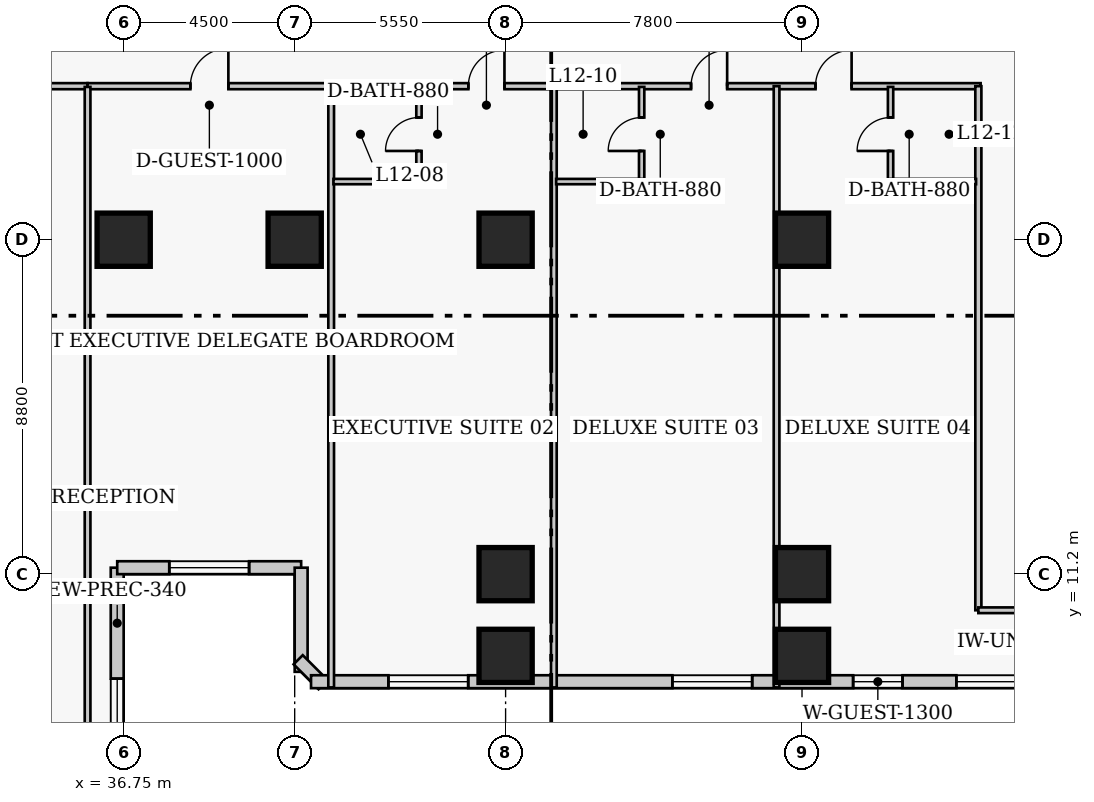
"""IFC4 building model, lengths in metres.
Left out: names, types, materials, properties, quantities, classifications, styles, units other than length and angle.
Written with IfcOpenShell. Run it as: python <this file> out.ifc"""

import sys

from ifc_helpers import new_model, si_unit, direction, frame, frame_2d, origin, origin_2d, place, context, subcontext, project, spatial, rectangle, extrude, element, fill, save


model = new_model("IFC4")
c1 = context("Model", 3, precision=1e-05, world=origin(), true_north=direction((0.0, 1.0)))
c2 = subcontext(c1, "Body", "Model", "MODEL_VIEW")
j1 = project(units=[si_unit("LENGTHUNIT", "METRE"), si_unit("PLANEANGLEUNIT", "RADIAN")], contexts=[c1])
p1 = place(None, origin())
s1 = spatial("IfcSite", under=j1, at=p1, CompositionType="ELEMENT")
p2 = place(p1, origin())
s2 = spatial("IfcBuilding", under=s1, at=p2, CompositionType="ELEMENT")
p3 = place(p2, frame((0.0, 0.0, 52.6)))
s3 = spatial("IfcBuildingStorey", under=s2, at=p3, CompositionType="ELEMENT", Elevation=52.6)
for number, where, z_axis, x_axis in (
    (1, (36.75, 20.0, 0.0), (0.0, 0.0, 1.0), (1.0, 0.0, 0.0)),
    (2, (41.25, 20.0, 0.0), (0.0, 0.0, 1.0), (1.0, 0.0, 0.0)),
    (3, (46.8, 11.2, 0.0), (0.0, 0.0, 1.0), (1.0, 0.0, 0.0)),
    (4, (46.8, 20.0, 0.0), (0.0, 0.0, 1.0), (1.0, 0.0, 0.0)),
    (5, (54.6, 11.2, 0.0), (0.0, 0.0, 1.0), (1.0, 0.0, 0.0)),
    (6, (54.6, 20.0, 0.0), (0.0, 0.0, 1.0), (1.0, 0.0, 0.0)),
    (7, (46.8, 9.05, 0.0), (0.0, 0.0, 1.0), (1.0, 0.0, 0.0)),
    (8, (54.6, 9.05, 0.0), (0.0, 0.0, 1.0), (1.0, 0.0, 0.0)),
):
    element("IfcColumn", number, at=place(p3, frame(where, z_axis=z_axis, x_axis=x_axis)), inside=s3, PredefinedType="COLUMN", context=c2, shape_type="SweptSolid", body=[
        extrude(rectangle(XDim=1.4, YDim=1.4, at=origin_2d()), origin(), (0.0, 0.0, 1.0), 3.8),
    ])
p4 = place(p3, frame((36.58, 3.43, 0.0), z_axis=(0.0, 0.0, 1.0), x_axis=(0.0, 1.0, 0.0)))
e9 = element("IfcWall", 9, at=p4, inside=s3, PredefinedType="SOLIDWALL", context=c2, shape_type="SweptSolid", body=[
    extrude(rectangle(XDim=7.94, YDim=0.34, at=frame_2d((3.97, 0.0))), origin(), (0.0, 0.0, 1.0), 3.54),
])
p5 = place(p4, frame((2.92, 0.0, 0.85)))
e10 = element("IfcOpeningElement", 10, at=p5, cuts=e9, PredefinedType="OPENING", context=c2, shape_type="SweptSolid", body=[
    extrude(rectangle(XDim=2.1, YDim=1.85, at=frame_2d((1.05, 0.925))), frame((0.0, 0.18, 0.0), z_axis=(0.0, -1.0, 0.0), x_axis=(1.0, 0.0, 0.0)), (0.0, 0.0, 1.0), 0.36),
])
p6 = place(p3, frame((36.58, 11.37, 0.0), z_axis=(0.0, 0.0, 1.0), x_axis=(1.0, 0.0, 0.0)))
e11 = element("IfcWall", 11, at=p6, inside=s3, PredefinedType="SOLIDWALL", context=c2, shape_type="SweptSolid", body=[
    extrude(rectangle(XDim=4.84, YDim=0.34, at=frame_2d((2.42, 0.0))), origin(), (0.0, 0.0, 1.0), 3.54),
])
p7 = place(p6, frame((1.37, 0.0, 0.85)))
e12 = element("IfcOpeningElement", 12, at=p7, cuts=e11, PredefinedType="OPENING", context=c2, shape_type="SweptSolid", body=[
    extrude(rectangle(XDim=2.1, YDim=1.85, at=frame_2d((1.05, 0.925))), frame((0.0, 0.18, 0.0), z_axis=(0.0, -1.0, 0.0), x_axis=(1.0, 0.0, 0.0)), (0.0, 0.0, 1.0), 0.36),
])
p8 = place(p3, frame((41.42, 11.37, 0.0), z_axis=(0.0, 0.0, 1.0), x_axis=(0.0, -1.0, 0.0)))
e13 = element("IfcWall", 13, at=p8, inside=s3, PredefinedType="SOLIDWALL", context=c2, shape_type="SweptSolid", body=[
    extrude(rectangle(XDim=2.74, YDim=0.34, at=frame_2d((1.37, 0.0))), origin(), (0.0, 0.0, 1.0), 3.54),
])
p9 = place(p3, frame((41.342, 8.948, 0.0), z_axis=(0.0, 0.0, 1.0), x_axis=(0.707238225886, -0.706975312048, 0.0)))
e14 = element("IfcWall", 14, at=p9, inside=s3, PredefinedType="SOLIDWALL", context=c2, shape_type="SweptSolid", body=[
    extrude(rectangle(XDim=0.929, YDim=0.34, at=frame_2d((0.464, 0.0))), origin(), (0.0, 0.0, 1.0), 3.54),
])
p10 = place(p3, frame((41.68, 8.37, 0.0), z_axis=(0.0, 0.0, 1.0), x_axis=(1.0, 0.0, 0.0)))
e15 = element("IfcWall", 15, at=p10, inside=s3, PredefinedType="SOLIDWALL", context=c2, shape_type="SweptSolid", body=[
    extrude(rectangle(XDim=29.89, YDim=0.34, at=frame_2d((14.945, 0.0))), origin(), (0.0, 0.0, 1.0), 3.54),
])
p11 = place(p10, frame((2.036, 0.0, 0.85)))
e16 = element("IfcOpeningElement", 16, at=p11, cuts=e15, PredefinedType="OPENING", context=c2, shape_type="SweptSolid", body=[
    extrude(rectangle(XDim=2.1, YDim=1.85, at=frame_2d((1.05, 0.925))), frame((0.0, 0.18, 0.0), z_axis=(0.0, -1.0, 0.0), x_axis=(1.0, 0.0, 0.0)), (0.0, 0.0, 1.0), 0.36),
])
p12 = place(p10, frame((9.509, 0.0, 0.85)))
e17 = element("IfcOpeningElement", 17, at=p12, cuts=e15, PredefinedType="OPENING", context=c2, shape_type="SweptSolid", body=[
    extrude(rectangle(XDim=2.1, YDim=1.85, at=frame_2d((1.05, 0.925))), frame((0.0, 0.18, 0.0), z_axis=(0.0, -1.0, 0.0), x_axis=(1.0, 0.0, 0.0)), (0.0, 0.0, 1.0), 0.36),
])
p13 = place(p10, frame((16.981, 0.0, 0.85)))
e18 = element("IfcOpeningElement", 18, at=p13, cuts=e15, PredefinedType="OPENING", context=c2, shape_type="SweptSolid", body=[
    extrude(rectangle(XDim=2.1, YDim=1.85, at=frame_2d((1.05, 0.925))), frame((0.0, 0.18, 0.0), z_axis=(0.0, -1.0, 0.0), x_axis=(1.0, 0.0, 0.0)), (0.0, 0.0, 1.0), 0.36),
])
p14 = place(p10, frame((26.254, 0.0, 0.85)))
e19 = element("IfcOpeningElement", 19, at=p14, cuts=e15, PredefinedType="OPENING", context=c2, shape_type="SweptSolid", body=[
    extrude(rectangle(XDim=2.1, YDim=1.85, at=frame_2d((1.05, 0.925))), frame((0.0, 0.18, 0.0), z_axis=(0.0, -1.0, 0.0), x_axis=(1.0, 0.0, 0.0)), (0.0, 0.0, 1.0), 0.36),
])
p15 = place(p10, frame((14.265, 0.0, 0.85)))
e20 = element("IfcOpeningElement", 20, at=p15, cuts=e15, PredefinedType="OPENING", context=c2, shape_type="SweptSolid", body=[
    extrude(rectangle(XDim=1.3, YDim=1.7, at=frame_2d((0.65, 0.85))), frame((0.0, 0.18, 0.0), z_axis=(0.0, -1.0, 0.0), x_axis=(1.0, 0.0, 0.0)), (0.0, 0.0, 1.0), 0.36),
])
p16 = place(p3, frame((20.4, 24.04, 0.0), z_axis=(0.0, 0.0, 1.0), x_axis=(1.0, 0.0, 0.0)))
e21 = element("IfcWall", 21, at=p16, inside=s3, PredefinedType="PARTITIONING", context=c2, shape_type="SweptSolid", body=[
    extrude(rectangle(XDim=15.4, YDim=0.16, at=frame_2d((7.7, 0.0))), origin(), (0.0, 0.0, 1.0), 3.54),
])
p17 = place(p16, frame((1.99, 0.0, 0.0)))
e22 = element("IfcOpeningElement", 22, at=p17, cuts=e21, PredefinedType="OPENING", context=c2, shape_type="SweptSolid", body=[
    extrude(rectangle(XDim=0.95, YDim=2.1, at=frame_2d((0.475, 1.05))), frame((0.0, 0.09, 0.0), z_axis=(0.0, -1.0, 0.0), x_axis=(1.0, 0.0, 0.0)), (0.0, 0.0, 1.0), 0.18),
])
p18 = place(p16, frame((10.79, 0.0, 0.0)))
e23 = element("IfcOpeningElement", 23, at=p18, cuts=e21, PredefinedType="OPENING", context=c2, shape_type="SweptSolid", body=[
    extrude(rectangle(XDim=1.0, YDim=2.15, at=frame_2d((0.5, 1.075))), frame((0.0, 0.09, 0.0), z_axis=(0.0, -1.0, 0.0), x_axis=(1.0, 0.0, 0.0)), (0.0, 0.0, 1.0), 0.18),
])
p19 = place(p3, frame((35.8, 24.04, 0.0), z_axis=(0.0, 0.0, 1.0), x_axis=(1.0, 0.0, 0.0)))
e24 = element("IfcWall", 24, at=p19, inside=s3, PredefinedType="PARTITIONING", context=c2, shape_type="SweptSolid", body=[
    extrude(rectangle(XDim=23.5, YDim=0.16, at=frame_2d((11.75, 0.0))), origin(), (0.0, 0.0, 1.0), 3.54),
])
p20 = place(p19, frame((2.705, 0.0, 0.0)))
e25 = element("IfcOpeningElement", 25, at=p20, cuts=e24, PredefinedType="OPENING", context=c2, shape_type="SweptSolid", body=[
    extrude(rectangle(XDim=1.0, YDim=2.15, at=frame_2d((0.5, 1.075))), frame((0.0, 0.09, 0.0), z_axis=(0.0, -1.0, 0.0), x_axis=(1.0, 0.0, 0.0)), (0.0, 0.0, 1.0), 0.18),
])
p21 = place(p19, frame((10.02, 0.0, 0.0)))
e26 = element("IfcOpeningElement", 26, at=p21, cuts=e24, PredefinedType="OPENING", context=c2, shape_type="SweptSolid", body=[
    extrude(rectangle(XDim=0.95, YDim=2.1, at=frame_2d((0.475, 1.05))), frame((0.0, 0.09, 0.0), z_axis=(0.0, -1.0, 0.0), x_axis=(1.0, 0.0, 0.0)), (0.0, 0.0, 1.0), 0.18),
])
p22 = place(p19, frame((15.88, 0.0, 0.0)))
e27 = element("IfcOpeningElement", 27, at=p22, cuts=e24, PredefinedType="OPENING", context=c2, shape_type="SweptSolid", body=[
    extrude(rectangle(XDim=0.95, YDim=2.1, at=frame_2d((0.475, 1.05))), frame((0.0, 0.09, 0.0), z_axis=(0.0, -1.0, 0.0), x_axis=(1.0, 0.0, 0.0)), (0.0, 0.0, 1.0), 0.18),
])
p23 = place(p19, frame((19.155, 0.0, 0.0)))
e28 = element("IfcOpeningElement", 28, at=p23, cuts=e24, PredefinedType="OPENING", context=c2, shape_type="SweptSolid", body=[
    extrude(rectangle(XDim=0.95, YDim=2.1, at=frame_2d((0.475, 1.05))), frame((0.0, 0.09, 0.0), z_axis=(0.0, -1.0, 0.0), x_axis=(1.0, 0.0, 0.0)), (0.0, 0.0, 1.0), 0.18),
])
p24 = place(p3, frame((59.24, 10.25, 0.0), z_axis=(0.0, 0.0, 1.0), x_axis=(0.0, 1.0, 0.0)))
e29 = element("IfcWall", 29, at=p24, inside=s3, PredefinedType="PARTITIONING", context=c2, shape_type="SweptSolid", body=[
    extrude(rectangle(XDim=13.79, YDim=0.16, at=frame_2d((6.895, 0.0))), origin(), (0.0, 0.0, 1.0), 3.54),
])
p25 = place(p3, frame((59.24, 10.25, 0.0), z_axis=(0.0, 0.0, 1.0), x_axis=(1.0, 0.0, 0.0)))
e30 = element("IfcWall", 30, at=p25, inside=s3, PredefinedType="PARTITIONING", context=c2, shape_type="SweptSolid", body=[
    extrude(rectangle(XDim=2.22, YDim=0.15, at=frame_2d((1.11, 0.0))), origin(), (0.0, 0.0, 1.0), 3.54),
])
p26 = place(p3, frame((35.8, 3.02, 0.0), z_axis=(0.0, 0.0, 1.0), x_axis=(0.0, 1.0, 0.0)))
e31 = element("IfcWall", 31, at=p26, inside=s3, PredefinedType="PARTITIONING", context=c2, shape_type="SweptSolid", body=[
    extrude(rectangle(XDim=21.0, YDim=0.15, at=frame_2d((10.5, 0.0))), origin(), (0.0, 0.0, 1.0), 3.54),
])
p27 = place(p3, frame((42.21, 8.22, 0.0), z_axis=(0.0, 0.0, 1.0), x_axis=(0.0, 1.0, 0.0)))
e32 = element("IfcWall", 32, at=p27, inside=s3, PredefinedType="PARTITIONING", context=c2, shape_type="SweptSolid", body=[
    extrude(rectangle(XDim=15.82, YDim=0.15, at=frame_2d((7.91, 0.0))), origin(), (0.0, 0.0, 1.0), 3.54),
])
p28 = place(p3, frame((44.52, 21.53, 0.0), z_axis=(0.0, 0.0, 1.0), x_axis=(0.0, 1.0, 0.0)))
e33 = element("IfcWall", 33, at=p28, inside=s3, PredefinedType="PLUMBINGWALL", context=c2, shape_type="SweptSolid", body=[
    extrude(rectangle(XDim=2.49, YDim=0.14, at=frame_2d((1.245, 0.0))), origin(), (0.0, 0.0, 1.0), 3.54),
])
p29 = place(p28, frame((0.805, 0.0, 0.0)))
e34 = element("IfcOpeningElement", 34, at=p29, cuts=e33, PredefinedType="OPENING", context=c2, shape_type="SweptSolid", body=[
    extrude(rectangle(XDim=0.88, YDim=2.05, at=frame_2d((0.44, 1.025))), frame((0.0, 0.08, 0.0), z_axis=(0.0, -1.0, 0.0), x_axis=(1.0, 0.0, 0.0)), (0.0, 0.0, 1.0), 0.16),
])
p30 = place(p3, frame((42.27, 21.53, 0.0), z_axis=(0.0, 0.0, 1.0), x_axis=(1.0, 0.0, 0.0)))
e35 = element("IfcWall", 35, at=p30, inside=s3, PredefinedType="PLUMBINGWALL", context=c2, shape_type="SweptSolid", body=[
    extrude(rectangle(XDim=2.25, YDim=0.14, at=frame_2d((1.125, 0.0))), origin(), (0.0, 0.0, 1.0), 3.54),
])
p31 = place(p3, frame((48.07, 8.22, 0.0), z_axis=(0.0, 0.0, 1.0), x_axis=(0.0, 1.0, 0.0)))
e36 = element("IfcWall", 36, at=p31, inside=s3, PredefinedType="PARTITIONING", context=c2, shape_type="SweptSolid", body=[
    extrude(rectangle(XDim=15.82, YDim=0.15, at=frame_2d((7.91, 0.0))), origin(), (0.0, 0.0, 1.0), 3.54),
])
p32 = place(p3, frame((50.38, 21.53, 0.0), z_axis=(0.0, 0.0, 1.0), x_axis=(0.0, 1.0, 0.0)))
e37 = element("IfcWall", 37, at=p32, inside=s3, PredefinedType="PLUMBINGWALL", context=c2, shape_type="SweptSolid", body=[
    extrude(rectangle(XDim=2.49, YDim=0.14, at=frame_2d((1.245, 0.0))), origin(), (0.0, 0.0, 1.0), 3.54),
])
p33 = place(p32, frame((0.805, 0.0, 0.0)))
e38 = element("IfcOpeningElement", 38, at=p33, cuts=e37, PredefinedType="OPENING", context=c2, shape_type="SweptSolid", body=[
    extrude(rectangle(XDim=0.88, YDim=2.05, at=frame_2d((0.44, 1.025))), frame((0.0, 0.08, 0.0), z_axis=(0.0, -1.0, 0.0), x_axis=(1.0, 0.0, 0.0)), (0.0, 0.0, 1.0), 0.16),
])
p34 = place(p3, frame((48.13, 21.53, 0.0), z_axis=(0.0, 0.0, 1.0), x_axis=(1.0, 0.0, 0.0)))
e39 = element("IfcWall", 39, at=p34, inside=s3, PredefinedType="PLUMBINGWALL", context=c2, shape_type="SweptSolid", body=[
    extrude(rectangle(XDim=2.25, YDim=0.14, at=frame_2d((1.125, 0.0))), origin(), (0.0, 0.0, 1.0), 3.54),
])
p35 = place(p3, frame((53.93, 8.22, 0.0), z_axis=(0.0, 0.0, 1.0), x_axis=(0.0, 1.0, 0.0)))
e40 = element("IfcWall", 40, at=p35, inside=s3, PredefinedType="PARTITIONING", context=c2, shape_type="SweptSolid", body=[
    extrude(rectangle(XDim=15.82, YDim=0.15, at=frame_2d((7.91, 0.0))), origin(), (0.0, 0.0, 1.0), 3.54),
])
p36 = place(p3, frame((56.93, 21.53, 0.0), z_axis=(0.0, 0.0, 1.0), x_axis=(0.0, 1.0, 0.0)))
e41 = element("IfcWall", 41, at=p36, inside=s3, PredefinedType="PLUMBINGWALL", context=c2, shape_type="SweptSolid", body=[
    extrude(rectangle(XDim=2.49, YDim=0.14, at=frame_2d((1.245, 0.0))), origin(), (0.0, 0.0, 1.0), 3.54),
])
p37 = place(p36, frame((0.805, 0.0, 0.0)))
e42 = element("IfcOpeningElement", 42, at=p37, cuts=e41, PredefinedType="OPENING", context=c2, shape_type="SweptSolid", body=[
    extrude(rectangle(XDim=0.88, YDim=2.05, at=frame_2d((0.44, 1.025))), frame((0.0, 0.08, 0.0), z_axis=(0.0, -1.0, 0.0), x_axis=(1.0, 0.0, 0.0)), (0.0, 0.0, 1.0), 0.16),
])
p38 = place(p3, frame((56.93, 21.53, 0.0), z_axis=(0.0, 0.0, 1.0), x_axis=(1.0, 0.0, 0.0)))
e43 = element("IfcWall", 43, at=p38, inside=s3, PredefinedType="PLUMBINGWALL", context=c2, shape_type="SweptSolid", body=[
    extrude(rectangle(XDim=2.25, YDim=0.14, at=frame_2d((1.125, 0.0))), origin(), (0.0, 0.0, 1.0), 3.54),
])
p39 = place(p5, origin())
e44 = element("IfcWindow", 44, at=p39, inside=s3, PartitioningType="SINGLE_PANEL", PredefinedType="WINDOW", context=c2, shape_type="SweptSolid", body=[
    extrude(rectangle(XDim=2.1, YDim=1.85, at=frame_2d((1.05, 0.925))), frame((0.0, 0.03, 0.0), z_axis=(0.0, -1.0, 0.0), x_axis=(1.0, 0.0, 0.0)), (0.0, 0.0, 1.0), 0.06),
])
fill(e10, e44)
p40 = place(p7, origin())
e45 = element("IfcWindow", 45, at=p40, inside=s3, PartitioningType="SINGLE_PANEL", PredefinedType="WINDOW", context=c2, shape_type="SweptSolid", body=[
    extrude(rectangle(XDim=2.1, YDim=1.85, at=frame_2d((1.05, 0.925))), frame((0.0, 0.03, 0.0), z_axis=(0.0, -1.0, 0.0), x_axis=(1.0, 0.0, 0.0)), (0.0, 0.0, 1.0), 0.06),
])
fill(e12, e45)
p41 = place(p11, origin())
e46 = element("IfcWindow", 46, at=p41, inside=s3, PartitioningType="SINGLE_PANEL", PredefinedType="WINDOW", context=c2, shape_type="SweptSolid", body=[
    extrude(rectangle(XDim=2.1, YDim=1.85, at=frame_2d((1.05, 0.925))), frame((0.0, 0.03, 0.0), z_axis=(0.0, -1.0, 0.0), x_axis=(1.0, 0.0, 0.0)), (0.0, 0.0, 1.0), 0.06),
])
fill(e16, e46)
p42 = place(p12, origin())
e47 = element("IfcWindow", 47, at=p42, inside=s3, PartitioningType="SINGLE_PANEL", PredefinedType="WINDOW", context=c2, shape_type="SweptSolid", body=[
    extrude(rectangle(XDim=2.1, YDim=1.85, at=frame_2d((1.05, 0.925))), frame((0.0, 0.03, 0.0), z_axis=(0.0, -1.0, 0.0), x_axis=(1.0, 0.0, 0.0)), (0.0, 0.0, 1.0), 0.06),
])
fill(e17, e47)
p43 = place(p13, origin())
e48 = element("IfcWindow", 48, at=p43, inside=s3, PartitioningType="SINGLE_PANEL", PredefinedType="WINDOW", context=c2, shape_type="SweptSolid", body=[
    extrude(rectangle(XDim=2.1, YDim=1.85, at=frame_2d((1.05, 0.925))), frame((0.0, 0.03, 0.0), z_axis=(0.0, -1.0, 0.0), x_axis=(1.0, 0.0, 0.0)), (0.0, 0.0, 1.0), 0.06),
])
fill(e18, e48)
p44 = place(p15, origin())
e49 = element("IfcWindow", 49, at=p44, inside=s3, PartitioningType="SINGLE_PANEL", PredefinedType="WINDOW", context=c2, shape_type="SweptSolid", body=[
    extrude(rectangle(XDim=1.3, YDim=1.7, at=frame_2d((0.65, 0.85))), frame((0.0, 0.03, 0.0), z_axis=(0.0, -1.0, 0.0), x_axis=(1.0, 0.0, 0.0)), (0.0, 0.0, 1.0), 0.06),
])
fill(e20, e49)
p45 = place(p20, origin())
e50 = element("IfcDoor", 50, at=p45, inside=s3, OperationType="SINGLE_SWING_RIGHT", PredefinedType="DOOR", context=c2, shape_type="SweptSolid", body=[
    extrude(rectangle(XDim=1.0, YDim=2.15, at=frame_2d((0.5, 1.075))), frame((0.0, 0.025, 0.0), z_axis=(0.0, -1.0, 0.0), x_axis=(1.0, 0.0, 0.0)), (0.0, 0.0, 1.0), 0.05),
])
fill(e25, e50)
p46 = place(p29, origin())
e51 = element("IfcDoor", 51, at=p46, inside=s3, OperationType="SINGLE_SWING_LEFT", PredefinedType="DOOR", context=c2, shape_type="SweptSolid", body=[
    extrude(rectangle(XDim=0.88, YDim=2.05, at=frame_2d((0.44, 1.025))), frame((0.0, 0.025, 0.0), z_axis=(0.0, -1.0, 0.0), x_axis=(1.0, 0.0, 0.0)), (0.0, 0.0, 1.0), 0.05),
])
fill(e34, e51)
p47 = place(p21, origin())
e52 = element("IfcDoor", 52, at=p47, inside=s3, OperationType="SINGLE_SWING_RIGHT", PredefinedType="DOOR", context=c2, shape_type="SweptSolid", body=[
    extrude(rectangle(XDim=0.95, YDim=2.1, at=frame_2d((0.475, 1.05))), frame((0.0, 0.025, 0.0), z_axis=(0.0, -1.0, 0.0), x_axis=(1.0, 0.0, 0.0)), (0.0, 0.0, 1.0), 0.05),
])
fill(e26, e52)
p48 = place(p33, origin())
e53 = element("IfcDoor", 53, at=p48, inside=s3, OperationType="SINGLE_SWING_LEFT", PredefinedType="DOOR", context=c2, shape_type="SweptSolid", body=[
    extrude(rectangle(XDim=0.88, YDim=2.05, at=frame_2d((0.44, 1.025))), frame((0.0, 0.025, 0.0), z_axis=(0.0, -1.0, 0.0), x_axis=(1.0, 0.0, 0.0)), (0.0, 0.0, 1.0), 0.05),
])
fill(e38, e53)
p49 = place(p22, origin())
e54 = element("IfcDoor", 54, at=p49, inside=s3, OperationType="SINGLE_SWING_RIGHT", PredefinedType="DOOR", context=c2, shape_type="SweptSolid", body=[
    extrude(rectangle(XDim=0.95, YDim=2.1, at=frame_2d((0.475, 1.05))), frame((0.0, 0.025, 0.0), z_axis=(0.0, -1.0, 0.0), x_axis=(1.0, 0.0, 0.0)), (0.0, 0.0, 1.0), 0.05),
])
fill(e27, e54)
p50 = place(p37, origin())
e55 = element("IfcDoor", 55, at=p50, inside=s3, OperationType="SINGLE_SWING_LEFT", PredefinedType="DOOR", context=c2, shape_type="SweptSolid", body=[
    extrude(rectangle(XDim=0.88, YDim=2.05, at=frame_2d((0.44, 1.025))), frame((0.0, 0.025, 0.0), z_axis=(0.0, -1.0, 0.0), x_axis=(1.0, 0.0, 0.0)), (0.0, 0.0, 1.0), 0.05),
])
fill(e42, e55)
p51 = place(p23, origin())
e56 = element("IfcDoor", 56, at=p51, inside=s3, OperationType="SINGLE_SWING_RIGHT", PredefinedType="DOOR", context=c2, shape_type="SweptSolid", body=[
    extrude(rectangle(XDim=0.95, YDim=2.1, at=frame_2d((0.475, 1.05))), frame((0.0, 0.025, 0.0), z_axis=(0.0, -1.0, 0.0), x_axis=(1.0, 0.0, 0.0)), (0.0, 0.0, 1.0), 0.05),
])
fill(e28, e56)
save(model, sys.argv[1])
